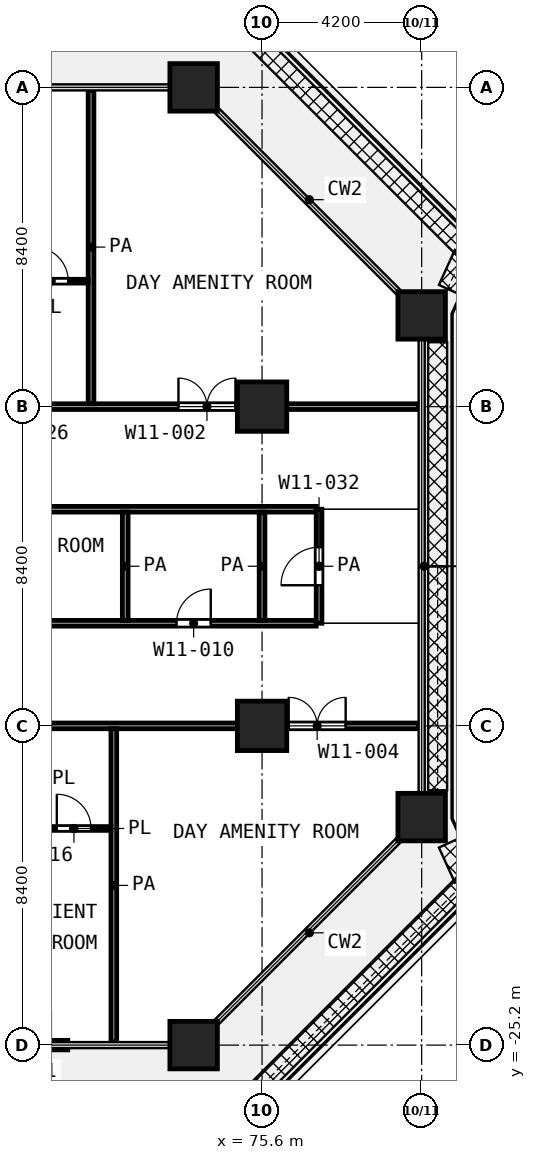
"""IFC4 building model, lengths in metres.
Left out: names, types, materials, properties, quantities, classifications, styles, units other than length and angle.
Written with IfcOpenShell. Run it as: python <this file> out.ifc"""

import sys

from ifc_helpers import new_model, si_unit, direction, frame, frame_2d, origin, origin_2d, place, context, subcontext, project, spatial, rectangle, extrude, element, fill, save


model = new_model("IFC4")
c1 = context("Model", 3, precision=1e-05, world=origin(), true_north=direction((0.0, 1.0)))
c2 = subcontext(c1, "Body", "Model", "MODEL_VIEW")
j1 = project(units=[si_unit("LENGTHUNIT", "METRE"), si_unit("PLANEANGLEUNIT", "RADIAN")], contexts=[c1])
p1 = place(None, origin())
s1 = spatial("IfcSite", under=j1, at=p1, CompositionType="ELEMENT")
p2 = place(p1, origin())
s2 = spatial("IfcBuilding", under=s1, at=p2, CompositionType="ELEMENT")
p3 = place(p2, frame((0.0, 0.0, 72.8)))
s3 = spatial("IfcBuildingStorey", under=s2, at=p3, CompositionType="ELEMENT", Elevation=72.8)
for number, where, z_axis, x_axis in (
    (1, (73.8, 0.0, 0.0), (0.0, 0.0, 1.0), (1.0, 0.0, 0.0)),
    (2, (79.8, -6.0, 0.0), (0.0, 0.0, 1.0), (1.0, 0.0, 0.0)),
):
    element("IfcColumn", number, at=place(p3, frame(where, z_axis=z_axis, x_axis=x_axis)), inside=s3, PredefinedType="COLUMN", context=c2, shape_type="SweptSolid", body=[
        extrude(rectangle(XDim=1.25, YDim=1.25, at=origin_2d()), origin(), (0.0, 0.0, 1.0), 4.2),
    ])
for number, where, z_axis, x_axis in (
    (3, (75.6, -8.4, 0.0), (0.0, 0.0, 1.0), (1.0, 0.0, 0.0)),
    (4, (75.6, -16.8, 0.0), (0.0, 0.0, 1.0), (1.0, 0.0, 0.0)),
):
    element("IfcColumn", number, at=place(p3, frame(where, z_axis=z_axis, x_axis=x_axis)), inside=s3, PredefinedType="COLUMN", context=c2, shape_type="SweptSolid", body=[
        extrude(rectangle(XDim=1.3, YDim=1.3, at=origin_2d()), origin(), (0.0, 0.0, 1.0), 4.2),
    ])
for number, where, z_axis, x_axis in (
    (5, (79.8, -19.2, 0.0), (0.0, 0.0, 1.0), (1.0, 0.0, 0.0)),
    (6, (73.8, -25.2, 0.0), (0.0, 0.0, 1.0), (1.0, 0.0, 0.0)),
):
    element("IfcColumn", number, at=place(p3, frame(where, z_axis=z_axis, x_axis=x_axis)), inside=s3, PredefinedType="COLUMN", context=c2, shape_type="SweptSolid", body=[
        extrude(rectangle(XDim=1.25, YDim=1.25, at=origin_2d()), origin(), (0.0, 0.0, 1.0), 4.2),
    ])
p4 = place(p3, frame((67.8, -25.2, 0.0), z_axis=(0.0, 0.0, 1.0), x_axis=(1.0, 0.0, 0.0)))
e7 = element("IfcWall", 7, at=p4, inside=s3, PredefinedType="SOLIDWALL", context=c2, shape_type="SweptSolid", body=[
    extrude(rectangle(XDim=2.688, YDim=0.25, at=frame_2d((1.344, 0.0))), origin(), (0.0, 0.0, 1.0), 3.78),
])
p5 = place(p4, frame((0.444, 0.0, 0.0)))
e8 = element("IfcOpeningElement", 8, at=p5, cuts=e7, PredefinedType="OPENING", context=c2, shape_type="SweptSolid", body=[
    extrude(rectangle(XDim=1.8, YDim=2.1, at=frame_2d((0.9, 1.05))), frame((0.0, 0.135, 0.0), z_axis=(0.0, -1.0, 0.0), x_axis=(1.0, 0.0, 0.0)), (0.0, 0.0, 1.0), 0.27),
])
p6 = place(p3, frame((69.65, -19.5, 0.0), z_axis=(0.0, 0.0, 1.0), x_axis=(1.0, 0.0, 0.0)))
e9 = element("IfcWall", 9, at=p6, inside=s3, PredefinedType="PARTITIONING", context=c2, shape_type="SweptSolid", body=[
    extrude(rectangle(XDim=1.975, YDim=0.1, at=frame_2d((0.988, 0.0))), origin(), (0.0, 0.0, 1.0), 3.9),
])
p7 = place(p6, frame((0.55, 0.0, 0.0)))
e10 = element("IfcOpeningElement", 10, at=p7, cuts=e9, PredefinedType="OPENING", context=c2, shape_type="SweptSolid", body=[
    extrude(rectangle(XDim=0.9, YDim=2.1, at=frame_2d((0.45, 1.05))), frame((0.0, 0.06, 0.0), z_axis=(0.0, -1.0, 0.0), x_axis=(1.0, 0.0, 0.0)), (0.0, 0.0, 1.0), 0.12),
])
p8 = place(p3, frame((69.052, -5.1, 0.0), z_axis=(0.0, 0.0, 1.0), x_axis=(1.0, 0.0, 0.0)))
e11 = element("IfcWall", 11, at=p8, inside=s3, PredefinedType="PARTITIONING", context=c2, shape_type="SweptSolid", body=[
    extrude(rectangle(XDim=1.973, YDim=0.1, at=frame_2d((0.986, 0.0))), origin(), (0.0, 0.0, 1.0), 3.9),
])
p9 = place(p8, frame((0.549, 0.0, 0.0)))
e12 = element("IfcOpeningElement", 12, at=p9, cuts=e11, PredefinedType="OPENING", context=c2, shape_type="SweptSolid", body=[
    extrude(rectangle(XDim=0.9, YDim=2.1, at=frame_2d((0.45, 1.05))), frame((0.0, 0.06, 0.0), z_axis=(0.0, -1.0, 0.0), x_axis=(1.0, 0.0, 0.0)), (0.0, 0.0, 1.0), 0.12),
])
p10 = place(p3, frame((25.1, -16.8, 0.0), z_axis=(0.0, 0.0, 1.0), x_axis=(1.0, 0.0, 0.0)))
e13 = element("IfcWall", 13, at=p10, inside=s3, PredefinedType="PARTITIONING", context=c2, shape_type="SweptSolid", body=[
    extrude(rectangle(XDim=54.62, YDim=0.15, at=frame_2d((27.31, 0.0))), origin(), (0.0, 0.0, 1.0), 3.9),
])
p11 = place(p10, frame((1.45, 0.0, 0.0)))
e14 = element("IfcOpeningElement", 14, at=p11, cuts=e13, PredefinedType="OPENING", context=c2, shape_type="SweptSolid", body=[
    extrude(rectangle(XDim=1.5, YDim=2.1, at=frame_2d((0.75, 1.05))), frame((0.0, 0.085, 0.0), z_axis=(0.0, -1.0, 0.0), x_axis=(1.0, 0.0, 0.0)), (0.0, 0.0, 1.0), 0.17),
])
p12 = place(p10, frame((9.25, 0.0, 0.0)))
e15 = element("IfcOpeningElement", 15, at=p12, cuts=e13, PredefinedType="OPENING", context=c2, shape_type="SweptSolid", body=[
    extrude(rectangle(XDim=1.5, YDim=2.1, at=frame_2d((0.75, 1.05))), frame((0.0, 0.085, 0.0), z_axis=(0.0, -1.0, 0.0), x_axis=(1.0, 0.0, 0.0)), (0.0, 0.0, 1.0), 0.17),
])
p13 = place(p10, frame((15.0, 0.0, 0.0)))
e16 = element("IfcOpeningElement", 16, at=p13, cuts=e13, PredefinedType="OPENING", context=c2, shape_type="SweptSolid", body=[
    extrude(rectangle(XDim=1.2, YDim=2.1, at=frame_2d((0.6, 1.05))), frame((0.0, 0.085, 0.0), z_axis=(0.0, -1.0, 0.0), x_axis=(1.0, 0.0, 0.0)), (0.0, 0.0, 1.0), 0.17),
])
p14 = place(p10, frame((17.6, 0.0, 0.0)))
e17 = element("IfcOpeningElement", 17, at=p14, cuts=e13, PredefinedType="OPENING", context=c2, shape_type="SweptSolid", body=[
    extrude(rectangle(XDim=1.2, YDim=2.1, at=frame_2d((0.6, 1.05))), frame((0.0, 0.085, 0.0), z_axis=(0.0, -1.0, 0.0), x_axis=(1.0, 0.0, 0.0)), (0.0, 0.0, 1.0), 0.17),
])
p15 = place(p10, frame((26.2, 0.0, 0.0)))
e18 = element("IfcOpeningElement", 18, at=p15, cuts=e13, PredefinedType="OPENING", context=c2, shape_type="SweptSolid", body=[
    extrude(rectangle(XDim=1.2, YDim=2.1, at=frame_2d((0.6, 1.05))), frame((0.0, 0.085, 0.0), z_axis=(0.0, -1.0, 0.0), x_axis=(1.0, 0.0, 0.0)), (0.0, 0.0, 1.0), 0.17),
])
p16 = place(p10, frame((23.4, 0.0, 0.0)))
e19 = element("IfcOpeningElement", 19, at=p16, cuts=e13, PredefinedType="OPENING", context=c2, shape_type="SweptSolid", body=[
    extrude(rectangle(XDim=1.2, YDim=2.1, at=frame_2d((0.6, 1.05))), frame((0.0, 0.085, 0.0), z_axis=(0.0, -1.0, 0.0), x_axis=(1.0, 0.0, 0.0)), (0.0, 0.0, 1.0), 0.17),
])
p17 = place(p10, frame((28.45, 0.0, 0.0)))
e20 = element("IfcOpeningElement", 20, at=p17, cuts=e13, PredefinedType="OPENING", context=c2, shape_type="SweptSolid", body=[
    extrude(rectangle(XDim=1.2, YDim=2.1, at=frame_2d((0.6, 1.05))), frame((0.0, 0.085, 0.0), z_axis=(0.0, -1.0, 0.0), x_axis=(1.0, 0.0, 0.0)), (0.0, 0.0, 1.0), 0.17),
])
p18 = place(p10, frame((31.8, 0.0, 0.0)))
e21 = element("IfcOpeningElement", 21, at=p18, cuts=e13, PredefinedType="OPENING", context=c2, shape_type="SweptSolid", body=[
    extrude(rectangle(XDim=1.2, YDim=2.1, at=frame_2d((0.6, 1.05))), frame((0.0, 0.085, 0.0), z_axis=(0.0, -1.0, 0.0), x_axis=(1.0, 0.0, 0.0)), (0.0, 0.0, 1.0), 0.17),
])
p19 = place(p10, frame((30.35, 0.0, 0.0)))
e22 = element("IfcOpeningElement", 22, at=p19, cuts=e13, PredefinedType="OPENING", context=c2, shape_type="SweptSolid", body=[
    extrude(rectangle(XDim=1.1, YDim=2.1, at=frame_2d((0.55, 1.05))), frame((0.0, 0.085, 0.0), z_axis=(0.0, -1.0, 0.0), x_axis=(1.0, 0.0, 0.0)), (0.0, 0.0, 1.0), 0.17),
])
p20 = place(p10, frame((40.2, 0.0, 0.0)))
e23 = element("IfcOpeningElement", 23, at=p20, cuts=e13, PredefinedType="OPENING", context=c2, shape_type="SweptSolid", body=[
    extrude(rectangle(XDim=1.2, YDim=2.1, at=frame_2d((0.6, 1.05))), frame((0.0, 0.085, 0.0), z_axis=(0.0, -1.0, 0.0), x_axis=(1.0, 0.0, 0.0)), (0.0, 0.0, 1.0), 0.17),
])
p21 = place(p10, frame((43.1, 0.0, 0.0)))
e24 = element("IfcOpeningElement", 24, at=p21, cuts=e13, PredefinedType="OPENING", context=c2, shape_type="SweptSolid", body=[
    extrude(rectangle(XDim=1.2, YDim=2.1, at=frame_2d((0.6, 1.05))), frame((0.0, 0.085, 0.0), z_axis=(0.0, -1.0, 0.0), x_axis=(1.0, 0.0, 0.0)), (0.0, 0.0, 1.0), 0.17),
])
p22 = place(p10, frame((51.2, 0.0, 0.0)))
e25 = element("IfcOpeningElement", 25, at=p22, cuts=e13, PredefinedType="OPENING", context=c2, shape_type="SweptSolid", body=[
    extrude(rectangle(XDim=1.5, YDim=2.1, at=frame_2d((0.75, 1.05))), frame((0.0, 0.085, 0.0), z_axis=(0.0, -1.0, 0.0), x_axis=(1.0, 0.0, 0.0)), (0.0, 0.0, 1.0), 0.17),
])
p23 = place(p3, frame((58.9, -14.1, 0.0), z_axis=(0.0, 0.0, 1.0), x_axis=(1.0, 0.0, 0.0)))
e26 = element("IfcWall", 26, at=p23, inside=s3, PredefinedType="PARTITIONING", context=c2, shape_type="SweptSolid", body=[
    extrude(rectangle(XDim=18.125, YDim=0.15, at=frame_2d((9.062, 0.0))), origin(), (0.0, 0.0, 1.0), 3.9),
])
p24 = place(p23, frame((5.9, 0.0, 0.0)))
e27 = element("IfcOpeningElement", 27, at=p24, cuts=e26, PredefinedType="OPENING", context=c2, shape_type="SweptSolid", body=[
    extrude(rectangle(XDim=1.2, YDim=2.1, at=frame_2d((0.6, 1.05))), frame((0.0, 0.085, 0.0), z_axis=(0.0, -1.0, 0.0), x_axis=(1.0, 0.0, 0.0)), (0.0, 0.0, 1.0), 0.17),
])
p25 = place(p23, frame((14.45, 0.0, 0.0)))
e28 = element("IfcOpeningElement", 28, at=p25, cuts=e26, PredefinedType="OPENING", context=c2, shape_type="SweptSolid", body=[
    extrude(rectangle(XDim=0.9, YDim=2.1, at=frame_2d((0.45, 1.05))), frame((0.0, 0.085, 0.0), z_axis=(0.0, -1.0, 0.0), x_axis=(1.0, 0.0, 0.0)), (0.0, 0.0, 1.0), 0.17),
])
p26 = place(p3, frame((58.9, -11.1, 0.0), z_axis=(0.0, 0.0, 1.0), x_axis=(1.0, 0.0, 0.0)))
e29 = element("IfcWall", 29, at=p26, inside=s3, PredefinedType="PARTITIONING", context=c2, shape_type="SweptSolid", body=[
    extrude(rectangle(XDim=18.125, YDim=0.15, at=frame_2d((9.062, 0.0))), origin(), (0.0, 0.0, 1.0), 3.9),
])
p27 = place(p3, frame((51.125, -8.4, 0.0), z_axis=(0.0, 0.0, 1.0), x_axis=(1.0, 0.0, 0.0)))
e30 = element("IfcWall", 30, at=p27, inside=s3, PredefinedType="PARTITIONING", context=c2, shape_type="SweptSolid", body=[
    extrude(rectangle(XDim=28.595, YDim=0.15, at=frame_2d((14.297, 0.0))), origin(), (0.0, 0.0, 1.0), 3.9),
])
p28 = place(p27, frame((1.825, 0.0, 0.0)))
e31 = element("IfcOpeningElement", 31, at=p28, cuts=e30, PredefinedType="OPENING", context=c2, shape_type="SweptSolid", body=[
    extrude(rectangle(XDim=1.2, YDim=2.1, at=frame_2d((0.6, 1.05))), frame((0.0, 0.085, 0.0), z_axis=(0.0, -1.0, 0.0), x_axis=(1.0, 0.0, 0.0)), (0.0, 0.0, 1.0), 0.17),
])
p29 = place(p27, frame((3.375, 0.0, 0.0)))
e32 = element("IfcOpeningElement", 32, at=p29, cuts=e30, PredefinedType="OPENING", context=c2, shape_type="SweptSolid", body=[
    extrude(rectangle(XDim=1.2, YDim=2.1, at=frame_2d((0.6, 1.05))), frame((0.0, 0.085, 0.0), z_axis=(0.0, -1.0, 0.0), x_axis=(1.0, 0.0, 0.0)), (0.0, 0.0, 1.0), 0.17),
])
p30 = place(p27, frame((5.775, 0.0, 0.0)))
e33 = element("IfcOpeningElement", 33, at=p30, cuts=e30, PredefinedType="OPENING", context=c2, shape_type="SweptSolid", body=[
    extrude(rectangle(XDim=1.2, YDim=2.1, at=frame_2d((0.6, 1.05))), frame((0.0, 0.085, 0.0), z_axis=(0.0, -1.0, 0.0), x_axis=(1.0, 0.0, 0.0)), (0.0, 0.0, 1.0), 0.17),
])
p31 = place(p27, frame((8.375, 0.0, 0.0)))
e34 = element("IfcOpeningElement", 34, at=p31, cuts=e30, PredefinedType="OPENING", context=c2, shape_type="SweptSolid", body=[
    extrude(rectangle(XDim=1.2, YDim=2.1, at=frame_2d((0.6, 1.05))), frame((0.0, 0.085, 0.0), z_axis=(0.0, -1.0, 0.0), x_axis=(1.0, 0.0, 0.0)), (0.0, 0.0, 1.0), 0.17),
])
p32 = place(p27, frame((13.675, 0.0, 0.0)))
e35 = element("IfcOpeningElement", 35, at=p32, cuts=e30, PredefinedType="OPENING", context=c2, shape_type="SweptSolid", body=[
    extrude(rectangle(XDim=1.2, YDim=2.1, at=frame_2d((0.6, 1.05))), frame((0.0, 0.085, 0.0), z_axis=(0.0, -1.0, 0.0), x_axis=(1.0, 0.0, 0.0)), (0.0, 0.0, 1.0), 0.17),
])
p33 = place(p27, frame((16.775, 0.0, 0.0)))
e36 = element("IfcOpeningElement", 36, at=p33, cuts=e30, PredefinedType="OPENING", context=c2, shape_type="SweptSolid", body=[
    extrude(rectangle(XDim=0.9, YDim=2.1, at=frame_2d((0.45, 1.05))), frame((0.0, 0.085, 0.0), z_axis=(0.0, -1.0, 0.0), x_axis=(1.0, 0.0, 0.0)), (0.0, 0.0, 1.0), 0.17),
])
p34 = place(p27, frame((22.275, 0.0, 0.0)))
e37 = element("IfcOpeningElement", 37, at=p34, cuts=e30, PredefinedType="OPENING", context=c2, shape_type="SweptSolid", body=[
    extrude(rectangle(XDim=1.5, YDim=2.1, at=frame_2d((0.75, 1.05))), frame((0.0, 0.085, 0.0), z_axis=(0.0, -1.0, 0.0), x_axis=(1.0, 0.0, 0.0)), (0.0, 0.0, 1.0), 0.17),
])
p35 = place(p3, frame((71.1, -8.325, 0.0), z_axis=(0.0, 0.0, 1.0), x_axis=(0.0, 1.0, 0.0)))
e38 = element("IfcWall", 38, at=p35, inside=s3, PredefinedType="PARTITIONING", context=c2, shape_type="SweptSolid", body=[
    extrude(rectangle(XDim=8.245, YDim=0.15, at=frame_2d((4.123, 0.0))), origin(), (0.0, 0.0, 1.0), 3.9),
])
p36 = place(p3, frame((71.7, -25.12, 0.0), z_axis=(0.0, 0.0, 1.0), x_axis=(0.0, 1.0, 0.0)))
e39 = element("IfcWall", 39, at=p36, inside=s3, PredefinedType="PARTITIONING", context=c2, shape_type="SweptSolid", body=[
    extrude(rectangle(XDim=8.245, YDim=0.15, at=frame_2d((4.123, 0.0))), origin(), (0.0, 0.0, 1.0), 3.9),
])
for number, where, z_axis, x_axis in (
    (40, (72.0, -14.025, 0.0), (0.0, 0.0, 1.0), (0.0, 1.0, 0.0)),
    (41, (75.6, -14.025, 0.0), (0.0, 0.0, 1.0), (0.0, 1.0, 0.0)),
):
    element("IfcWall", number, at=place(p3, frame(where, z_axis=z_axis, x_axis=x_axis)), inside=s3, PredefinedType="PARTITIONING", context=c2, shape_type="SweptSolid", body=[
        extrude(rectangle(XDim=2.85, YDim=0.15, at=frame_2d((1.425, 0.0))), origin(), (0.0, 0.0, 1.0), 3.9),
    ])
p37 = place(p3, frame((77.1, -14.1, 0.0), z_axis=(0.0, 0.0, 1.0), x_axis=(0.0, 1.0, 0.0)))
e42 = element("IfcWall", 42, at=p37, inside=s3, PredefinedType="PARTITIONING", context=c2, shape_type="SweptSolid", body=[
    extrude(rectangle(XDim=3.0, YDim=0.15, at=frame_2d((1.5, 0.0))), origin(), (0.0, 0.0, 1.0), 3.9),
])
p38 = place(p37, frame((1.0, 0.0, 0.0)))
e43 = element("IfcOpeningElement", 43, at=p38, cuts=e42, PredefinedType="OPENING", context=c2, shape_type="SweptSolid", body=[
    extrude(rectangle(XDim=1.0, YDim=2.1, at=frame_2d((0.5, 1.05))), frame((0.0, 0.085, 0.0), z_axis=(0.0, -1.0, 0.0), x_axis=(1.0, 0.0, 0.0)), (0.0, 0.0, 1.0), 0.17),
])
p39 = place(p9, origin())
e44 = element("IfcDoor", 44, at=p39, inside=s3, OperationType="SINGLE_SWING_LEFT", PredefinedType="DOOR", context=c2, shape_type="SweptSolid", body=[
    extrude(rectangle(XDim=0.9, YDim=2.1, at=frame_2d((0.45, 1.05))), frame((0.0, 0.025, 0.0), z_axis=(0.0, -1.0, 0.0), x_axis=(1.0, 0.0, 0.0)), (0.0, 0.0, 1.0), 0.05),
])
fill(e12, e44)
p40 = place(p34, origin())
e45 = element("IfcDoor", 45, at=p40, inside=s3, OperationType="DOUBLE_DOOR_SINGLE_SWING", PredefinedType="DOOR", context=c2, shape_type="SweptSolid", body=[
    extrude(rectangle(XDim=1.5, YDim=2.1, at=frame_2d((0.75, 1.05))), frame((0.0, 0.025, 0.0), z_axis=(0.0, -1.0, 0.0), x_axis=(1.0, 0.0, 0.0)), (0.0, 0.0, 1.0), 0.05),
])
fill(e37, e45)
p41 = place(p25, origin())
e46 = element("IfcDoor", 46, at=p41, inside=s3, OperationType="SINGLE_SWING_RIGHT", PredefinedType="DOOR", context=c2, shape_type="SweptSolid", body=[
    extrude(rectangle(XDim=0.9, YDim=2.1, at=frame_2d((0.45, 1.05))), frame((0.0, 0.025, 0.0), z_axis=(0.0, -1.0, 0.0), x_axis=(1.0, 0.0, 0.0)), (0.0, 0.0, 1.0), 0.05),
])
fill(e28, e46)
p42 = place(p38, origin())
e47 = element("IfcDoor", 47, at=p42, inside=s3, OperationType="SINGLE_SWING_LEFT", PredefinedType="DOOR", context=c2, shape_type="SweptSolid", body=[
    extrude(rectangle(XDim=1.0, YDim=2.1, at=frame_2d((0.5, 1.05))), frame((0.0, 0.025, 0.0), z_axis=(0.0, -1.0, 0.0), x_axis=(1.0, 0.0, 0.0)), (0.0, 0.0, 1.0), 0.05),
])
fill(e43, e47)
p43 = place(p7, origin())
e48 = element("IfcDoor", 48, at=p43, inside=s3, OperationType="SINGLE_SWING_LEFT", PredefinedType="DOOR", context=c2, shape_type="SweptSolid", body=[
    extrude(rectangle(XDim=0.9, YDim=2.1, at=frame_2d((0.45, 1.05))), frame((0.0, 0.025, 0.0), z_axis=(0.0, -1.0, 0.0), x_axis=(1.0, 0.0, 0.0)), (0.0, 0.0, 1.0), 0.05),
])
fill(e10, e48)
p44 = place(p22, origin())
e49 = element("IfcDoor", 49, at=p44, inside=s3, OperationType="DOUBLE_DOOR_SINGLE_SWING", PredefinedType="DOOR", context=c2, shape_type="SweptSolid", body=[
    extrude(rectangle(XDim=1.5, YDim=2.1, at=frame_2d((0.75, 1.05))), frame((0.0, 0.025, 0.0), z_axis=(0.0, -1.0, 0.0), x_axis=(1.0, 0.0, 0.0)), (0.0, 0.0, 1.0), 0.05),
])
fill(e25, e49)
save(model, sys.argv[1])
